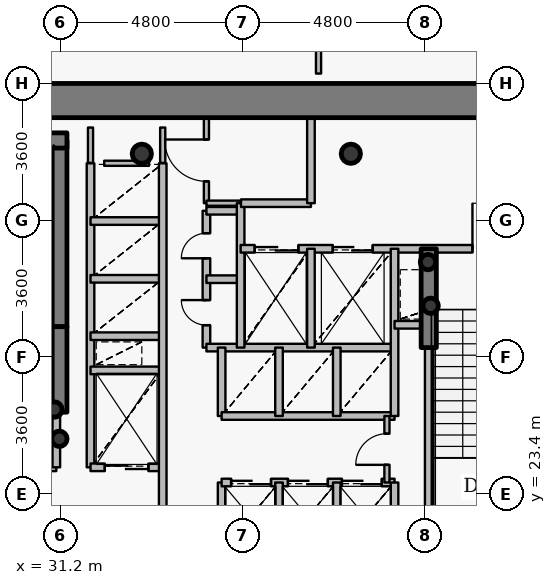
"""IFC4 building model, lengths in metres.
Left out: names, types, materials, properties, quantities, classifications, styles, units other than length and angle.
Written with IfcOpenShell. Run it as: python <this file> out.ifc"""

import sys

from ifc_helpers import new_model, si_unit, direction, frame, frame_2d, origin, origin_2d, place, context, subcontext, project, spatial, rectangle, hollow_circle, extrude, source, transform, mapped, element, fill, save


model = new_model("IFC4")
c1 = context("Model", 3, precision=1e-05, world=origin(), true_north=direction((0.0, 1.0)))
c2 = subcontext(c1, "Body", "Model", "MODEL_VIEW")
j1 = project(units=[si_unit("LENGTHUNIT", "METRE"), si_unit("PLANEANGLEUNIT", "RADIAN")], contexts=[c1])
p1 = place(None, origin())
s1 = spatial("IfcSite", under=j1, at=p1, CompositionType="ELEMENT")
p2 = place(p1, origin())
s2 = spatial("IfcBuilding", under=s1, at=p2, CompositionType="ELEMENT")
p3 = place(p2, frame((0.0, 0.0, 57.6)))
s3 = spatial("IfcBuildingStorey", under=s2, at=p3, CompositionType="ELEMENT", Elevation=57.6)
for number, where, z_axis, x_axis in (
    (1, (38.85, 32.35, 0.0), (0.0, 0.0, 1.0), (1.0, 0.0, 0.0)),
    (2, (33.35, 32.35, 0.0), (0.0, 0.0, 1.0), (1.0, 0.0, 0.0)),
):
    element("IfcColumn", number, at=place(p3, frame(where, z_axis=z_axis, x_axis=x_axis)), inside=s3, PredefinedType="COLUMN", context=c2, shape_type="SweptSolid", body=[
        extrude(hollow_circle(Radius=0.254, WallThickness=0.02, at=origin_2d()), origin(), (0.0, 0.0, 1.0), 4.2),
    ])
p4 = place(p3, frame((31.18, 27.8, 0.0), z_axis=(0.0, 0.0, 1.0), x_axis=(0.0, 1.0, 0.0)))
e3 = element("IfcWall", 3, at=p4, inside=s3, PredefinedType="SHEAR", context=c2, shape_type="SweptSolid", body=[
    extrude(rectangle(XDim=4.9, YDim=0.4, at=frame_2d((2.45, 0.0))), origin(), (0.0, 0.0, 1.0), 4.2),
])
p5 = place(p3, frame((27.28, 32.7, 0.0), z_axis=(0.0, 0.0, 1.0), x_axis=(1.0, 0.0, 0.0)))
e4 = element("IfcWall", 4, at=p5, inside=s3, PredefinedType="SHEAR", context=c2, shape_type="SweptSolid", body=[
    extrude(rectangle(XDim=4.1, YDim=0.4, at=frame_2d((2.05, 0.0))), origin(), (0.0, 0.0, 1.0), 4.2),
])
for number, where, z_axis, x_axis in (
    (5, (31.05, 25.62, 0.0), (0.0, 0.0, 1.0), (1.0, 0.0, 0.0)),
    (6, (31.18, 24.85, 0.0), (0.0, 0.0, 1.0), (1.0, 0.0, 0.0)),
    (7, (40.95, 28.35, 0.0), (0.0, 0.0, 1.0), (1.0, 0.0, 0.0)),
    (8, (40.88, 29.5, 0.0), (0.0, 0.0, 1.0), (1.0, 0.0, 0.0)),
):
    element("IfcColumn", number, at=place(p3, frame(where, z_axis=z_axis, x_axis=x_axis)), inside=s3, PredefinedType="COLUMN", context=c2, shape_type="SweptSolid", body=[
        extrude(hollow_circle(Radius=0.203, WallThickness=0.016, at=origin_2d()), origin(), (0.0, 0.0, 1.0), 4.2),
    ])
p6 = place(p3, frame((26.75, 33.75, 0.0), z_axis=(0.0, 0.0, 1.0), x_axis=(1.0, 0.0, 0.0)))
e9 = element("IfcWall", 9, at=p6, inside=s3, PredefinedType="SHEAR", context=c2, shape_type="SweptSolid", body=[
    extrude(rectangle(XDim=18.5, YDim=0.9, at=frame_2d((9.25, 0.0))), origin(), (0.0, 0.0, 1.0), 3.4),
])
p7 = place(p3, frame((31.18, 25.55, 0.0), z_axis=(0.0, 0.0, 1.0), x_axis=(0.0, 1.0, 0.0)))
e10 = element("IfcWall", 10, at=p7, inside=s3, PredefinedType="SHEAR", context=c2, shape_type="SweptSolid", body=[
    extrude(rectangle(XDim=2.25, YDim=0.4, at=frame_2d((1.125, 0.0))), origin(), (0.0, 0.0, 1.0), 3.55),
])
p8 = place(p3, frame((40.9, 27.25, 0.0), z_axis=(0.0, 0.0, 1.0), x_axis=(0.0, 1.0, 0.0)))
e11 = element("IfcWall", 11, at=p8, inside=s3, PredefinedType="SHEAR", context=c2, shape_type="SweptSolid", body=[
    extrude(rectangle(XDim=2.6, YDim=0.4, at=frame_2d((1.3, 0.0))), origin(), (0.0, 0.0, 1.0), 3.55),
])
p9 = place(p3, frame((27.56, 24.1, 0.0), z_axis=(0.0, 0.0, 1.0), x_axis=(1.0, 0.0, 0.0)))
e12 = element("IfcWall", 12, at=p9, inside=s3, PredefinedType="PARTITIONING", context=c2, shape_type="SweptSolid", body=[
    extrude(rectangle(XDim=3.54, YDim=0.2, at=frame_2d((1.77, 0.0))), origin(), (0.0, 0.0, 1.0), 3.95),
])
p10 = place(p9, frame((1.17, 0.0, 0.0)))
e13 = element("IfcOpeningElement", 13, at=p10, cuts=e12, PredefinedType="OPENING", context=c2, shape_type="SweptSolid", body=[
    extrude(rectangle(XDim=1.2, YDim=2.15, at=origin_2d()), frame((0.6, 0.11, 1.075), z_axis=(0.0, -1.0, 0.0), x_axis=(1.0, 0.0, 0.0)), (0.0, 0.0, 1.0), 0.22),
])
p11 = place(p3, frame((31.1, 24.1, 0.0), z_axis=(0.0, 0.0, 1.0), x_axis=(0.0, 1.0, 0.0)))
e14 = element("IfcWall", 14, at=p11, inside=s3, PredefinedType="PARTITIONING", context=c2, shape_type="SweptSolid", body=[
    extrude(rectangle(XDim=1.44, YDim=0.2, at=frame_2d((0.72, 0.0))), origin(), (0.0, 0.0, 1.0), 3.95),
])
p12 = place(p3, frame((32.0, 24.1, 0.0), z_axis=(0.0, 0.0, 1.0), x_axis=(0.0, 1.0, 0.0)))
e15 = element("IfcWall", 15, at=p12, inside=s3, PredefinedType="PARTITIONING", context=c2, shape_type="SweptSolid", body=[
    extrude(rectangle(XDim=8.0, YDim=0.2, at=frame_2d((4.0, 0.0))), origin(), (0.0, 0.0, 1.0), 3.95),
])
p13 = place(p3, frame((32.0, 24.1, 0.0), z_axis=(0.0, 0.0, 1.0), x_axis=(1.0, 0.0, 0.0)))
e16 = element("IfcWall", 16, at=p13, inside=s3, PredefinedType="PARTITIONING", context=c2, shape_type="SweptSolid", body=[
    extrude(rectangle(XDim=1.9, YDim=0.2, at=frame_2d((0.95, 0.0))), origin(), (0.0, 0.0, 1.0), 3.535),
])
p14 = place(p13, frame((0.375, 0.0, 0.0)))
e17 = element("IfcOpeningElement", 17, at=p14, cuts=e16, PredefinedType="OPENING", context=c2, shape_type="SweptSolid", body=[
    extrude(rectangle(XDim=1.15, YDim=2.15, at=origin_2d()), frame((0.575, 0.11, 1.075), z_axis=(0.0, -1.0, 0.0), x_axis=(1.0, 0.0, 0.0)), (0.0, 0.0, 1.0), 0.22),
])
for number, where, z_axis, x_axis in (
    (18, (32.0, 26.65, 0.0), (0.0, 0.0, 1.0), (1.0, 0.0, 0.0)),
    (19, (32.0, 27.55, 0.0), (0.0, 0.0, 1.0), (1.0, 0.0, 0.0)),
    (20, (32.0, 29.06, 0.0), (0.0, 0.0, 1.0), (1.0, 0.0, 0.0)),
    (21, (32.0, 30.58, 0.0), (0.0, 0.0, 1.0), (1.0, 0.0, 0.0)),
):
    element("IfcWall", number, at=place(p3, frame(where, z_axis=z_axis, x_axis=x_axis)), inside=s3, PredefinedType="PARTITIONING", context=c2, shape_type="SweptSolid", body=[
        extrude(rectangle(XDim=1.9, YDim=0.2, at=frame_2d((0.95, 0.0))), origin(), (0.0, 0.0, 1.0), 3.535),
    ])
p15 = place(p3, frame((33.9, 20.7, 0.0), z_axis=(0.0, 0.0, 1.0), x_axis=(0.0, 1.0, 0.0)))
e22 = element("IfcWall", 22, at=p15, inside=s3, PredefinedType="PARTITIONING", context=c2, shape_type="SweptSolid", body=[
    extrude(rectangle(XDim=11.4, YDim=0.2, at=frame_2d((5.7, 0.0))), origin(), (0.0, 0.0, 1.0), 3.535),
])
p16 = place(p3, frame((35.05, 27.25, 0.0), z_axis=(0.0, 0.0, 1.0), x_axis=(0.0, 1.0, 0.0)))
e23 = element("IfcWall", 23, at=p16, inside=s3, PredefinedType="PARTITIONING", context=c2, shape_type="SweptSolid", body=[
    extrude(rectangle(XDim=3.6, YDim=0.2, at=frame_2d((1.8, 0.0))), origin(), (0.0, 0.0, 1.0), 3.95),
])
p17 = place(p16, frame((0.59, 0.0, 0.0)))
e24 = element("IfcOpeningElement", 24, at=p17, cuts=e23, PredefinedType="OPENING", context=c2, shape_type="SweptSolid", body=[
    extrude(rectangle(XDim=0.66, YDim=2.05, at=origin_2d()), frame((0.33, 0.11, 1.025), z_axis=(0.0, -1.0, 0.0), x_axis=(1.0, 0.0, 0.0)), (0.0, 0.0, 1.0), 0.22),
])
p18 = place(p16, frame((2.35, 0.0, 0.0)))
e25 = element("IfcOpeningElement", 25, at=p18, cuts=e23, PredefinedType="OPENING", context=c2, shape_type="SweptSolid", body=[
    extrude(rectangle(XDim=0.66, YDim=2.05, at=origin_2d()), frame((0.33, 0.11, 1.025), z_axis=(0.0, -1.0, 0.0), x_axis=(1.0, 0.0, 0.0)), (0.0, 0.0, 1.0), 0.22),
])
p19 = place(p3, frame((35.05, 27.25, 0.0), z_axis=(0.0, 0.0, 1.0), x_axis=(1.0, 0.0, 0.0)))
e26 = element("IfcWall", 26, at=p19, inside=s3, PredefinedType="PARTITIONING", context=c2, shape_type="SweptSolid", body=[
    extrude(rectangle(XDim=4.95, YDim=0.2, at=frame_2d((2.475, 0.0))), origin(), (0.0, 0.0, 1.0), 3.535),
])
for number, where, z_axis, x_axis in (
    (27, (35.05, 29.05, 0.0), (0.0, 0.0, 1.0), (1.0, 0.0, 0.0)),
    (28, (35.05, 30.85, 0.0), (0.0, 0.0, 1.0), (1.0, 0.0, 0.0)),
):
    element("IfcWall", number, at=place(p3, frame(where, z_axis=z_axis, x_axis=x_axis)), inside=s3, PredefinedType="PARTITIONING", context=c2, shape_type="SweptSolid", body=[
        extrude(rectangle(XDim=0.9, YDim=0.2, at=frame_2d((0.45, 0.0))), origin(), (0.0, 0.0, 1.0), 3.95),
    ])
p20 = place(p3, frame((35.05, 31.05, 0.0), z_axis=(0.0, 0.0, 1.0), x_axis=(0.0, 1.0, 0.0)))
e29 = element("IfcWall", 29, at=p20, inside=s3, PredefinedType="PARTITIONING", context=c2, shape_type="SweptSolid", body=[
    extrude(rectangle(XDim=2.25, YDim=0.135, at=frame_2d((1.125, 0.0))), origin(), (0.0, 0.0, 1.0), 3.535),
])
p21 = place(p20, frame((0.575, 0.0, 0.0)))
e30 = element("IfcOpeningElement", 30, at=p21, cuts=e29, PredefinedType="OPENING", context=c2, shape_type="SweptSolid", body=[
    extrude(rectangle(XDim=1.1, YDim=2.15, at=origin_2d()), frame((0.55, 0.078, 1.075), z_axis=(0.0, -1.0, 0.0), x_axis=(1.0, 0.0, 0.0)), (0.0, 0.0, 1.0), 0.155),
])
p22 = place(p3, frame((35.05, 31.05, 0.0), z_axis=(0.0, 0.0, 1.0), x_axis=(1.0, 0.0, 0.0)))
e31 = element("IfcWall", 31, at=p22, inside=s3, PredefinedType="PARTITIONING", context=c2, shape_type="SweptSolid", body=[
    extrude(rectangle(XDim=0.9, YDim=0.135, at=frame_2d((0.45, 0.0))), origin(), (0.0, 0.0, 1.0), 3.95),
])
p23 = place(p3, frame((35.45, 21.9, 0.0), z_axis=(0.0, 0.0, 1.0), x_axis=(0.0, 1.0, 0.0)))
e32 = element("IfcWall", 32, at=p23, inside=s3, PredefinedType="PARTITIONING", context=c2, shape_type="SweptSolid", body=[
    extrude(rectangle(XDim=1.8, YDim=0.2, at=frame_2d((0.9, 0.0))), origin(), (0.0, 0.0, 1.0), 3.95),
])
p24 = place(p3, frame((35.45, 23.7, 0.0), z_axis=(0.0, 0.0, 1.0), x_axis=(1.0, 0.0, 0.0)))
e33 = element("IfcWall", 33, at=p24, inside=s3, PredefinedType="PARTITIONING", context=c2, shape_type="SweptSolid", body=[
    extrude(rectangle(XDim=4.55, YDim=0.2, at=frame_2d((2.275, 0.0))), origin(), (0.0, 0.0, 1.0), 3.535),
])
p25 = place(p24, frame((0.25, 0.0, 0.0)))
e34 = element("IfcOpeningElement", 34, at=p25, cuts=e33, PredefinedType="OPENING", context=c2, shape_type="SweptSolid", body=[
    extrude(rectangle(XDim=1.05, YDim=2.15, at=origin_2d()), frame((0.525, 0.11, 1.075), z_axis=(0.0, -1.0, 0.0), x_axis=(1.0, 0.0, 0.0)), (0.0, 0.0, 1.0), 0.22),
])
p26 = place(p24, frame((1.745, 0.0, 0.0)))
e35 = element("IfcOpeningElement", 35, at=p26, cuts=e33, PredefinedType="OPENING", context=c2, shape_type="SweptSolid", body=[
    extrude(rectangle(XDim=1.05, YDim=2.15, at=origin_2d()), frame((0.525, 0.11, 1.075), z_axis=(0.0, -1.0, 0.0), x_axis=(1.0, 0.0, 0.0)), (0.0, 0.0, 1.0), 0.22),
])
p27 = place(p24, frame((3.165, 0.0, 0.0)))
e36 = element("IfcOpeningElement", 36, at=p27, cuts=e33, PredefinedType="OPENING", context=c2, shape_type="SweptSolid", body=[
    extrude(rectangle(XDim=1.05, YDim=2.15, at=origin_2d()), frame((0.525, 0.11, 1.075), z_axis=(0.0, -1.0, 0.0), x_axis=(1.0, 0.0, 0.0)), (0.0, 0.0, 1.0), 0.22),
])
p28 = place(p3, frame((35.45, 25.45, 0.0), z_axis=(0.0, 0.0, 1.0), x_axis=(0.0, 1.0, 0.0)))
e37 = element("IfcWall", 37, at=p28, inside=s3, PredefinedType="PARTITIONING", context=c2, shape_type="SweptSolid", body=[
    extrude(rectangle(XDim=1.8, YDim=0.2, at=frame_2d((0.9, 0.0))), origin(), (0.0, 0.0, 1.0), 3.95),
])
p29 = place(p3, frame((35.45, 25.45, 0.0), z_axis=(0.0, 0.0, 1.0), x_axis=(1.0, 0.0, 0.0)))
e38 = element("IfcWall", 38, at=p29, inside=s3, PredefinedType="PARTITIONING", context=c2, shape_type="SweptSolid", body=[
    extrude(rectangle(XDim=4.55, YDim=0.2, at=frame_2d((2.275, 0.0))), origin(), (0.0, 0.0, 1.0), 3.535),
])
p30 = place(p3, frame((35.95, 27.25, 0.0), z_axis=(0.0, 0.0, 1.0), x_axis=(0.0, 1.0, 0.0)))
e39 = element("IfcWall", 39, at=p30, inside=s3, PredefinedType="PARTITIONING", context=c2, shape_type="SweptSolid", body=[
    extrude(rectangle(XDim=3.8, YDim=0.2, at=frame_2d((1.9, 0.0))), origin(), (0.0, 0.0, 1.0), 3.95),
])
p31 = place(p3, frame((35.95, 29.85, 0.0), z_axis=(0.0, 0.0, 1.0), x_axis=(1.0, 0.0, 0.0)))
e40 = element("IfcWall", 40, at=p31, inside=s3, PredefinedType="PARTITIONING", context=c2, shape_type="SweptSolid", body=[
    extrude(rectangle(XDim=8.49, YDim=0.2, at=frame_2d((4.245, 0.0))), origin(), (0.0, 0.0, 1.0), 3.535),
])
p32 = place(p31, frame((6.1, 0.0, 0.0)))
e41 = element("IfcOpeningElement", 41, at=p32, cuts=e40, PredefinedType="OPENING", context=c2, shape_type="SweptSolid", body=[
    extrude(rectangle(XDim=1.2, YDim=2.15, at=origin_2d()), frame((0.6, 0.11, 1.075), z_axis=(0.0, -1.0, 0.0), x_axis=(1.0, 0.0, 0.0)), (0.0, 0.0, 1.0), 0.22),
])
p33 = place(p31, frame((0.37, 0.0, 0.0)))
e42 = element("IfcOpeningElement", 42, at=p33, cuts=e40, PredefinedType="OPENING", context=c2, shape_type="SweptSolid", body=[
    extrude(rectangle(XDim=1.15, YDim=2.15, at=origin_2d()), frame((0.575, 0.11, 1.075), z_axis=(0.0, -1.0, 0.0), x_axis=(1.0, 0.0, 0.0)), (0.0, 0.0, 1.0), 0.22),
])
p34 = place(p31, frame((2.425, 0.0, 0.0)))
e43 = element("IfcOpeningElement", 43, at=p34, cuts=e40, PredefinedType="OPENING", context=c2, shape_type="SweptSolid", body=[
    extrude(rectangle(XDim=1.05, YDim=2.15, at=origin_2d()), frame((0.525, 0.11, 1.075), z_axis=(0.0, -1.0, 0.0), x_axis=(1.0, 0.0, 0.0)), (0.0, 0.0, 1.0), 0.22),
])
p35 = place(p3, frame((35.96, 31.05, 0.0), z_axis=(0.0, 0.0, 1.0), x_axis=(1.0, 0.0, 0.0)))
e44 = element("IfcWall", 44, at=p35, inside=s3, PredefinedType="PARTITIONING", context=c2, shape_type="SweptSolid", body=[
    extrude(rectangle(XDim=1.84, YDim=0.2, at=frame_2d((0.92, 0.0))), origin(), (0.0, 0.0, 1.0), 3.95),
])
for number, where, z_axis, x_axis in (
    (45, (36.96, 21.9, 0.0), (0.0, 0.0, 1.0), (0.0, 1.0, 0.0)),
    (46, (36.96, 25.45, 0.0), (0.0, 0.0, 1.0), (0.0, 1.0, 0.0)),
):
    element("IfcWall", number, at=place(p3, frame(where, z_axis=z_axis, x_axis=x_axis)), inside=s3, PredefinedType="PARTITIONING", context=c2, shape_type="SweptSolid", body=[
        extrude(rectangle(XDim=1.8, YDim=0.2, at=frame_2d((0.9, 0.0))), origin(), (0.0, 0.0, 1.0), 3.95),
    ])
p36 = place(p3, frame((37.8, 27.25, 0.0), z_axis=(0.0, 0.0, 1.0), x_axis=(0.0, 1.0, 0.0)))
e47 = element("IfcWall", 47, at=p36, inside=s3, PredefinedType="PARTITIONING", context=c2, shape_type="SweptSolid", body=[
    extrude(rectangle(XDim=2.6, YDim=0.2, at=frame_2d((1.3, 0.0))), origin(), (0.0, 0.0, 1.0), 3.95),
])
p37 = place(p3, frame((37.8, 31.05, 0.0), z_axis=(0.0, 0.0, 1.0), x_axis=(0.0, 1.0, 0.0)))
e48 = element("IfcWall", 48, at=p37, inside=s3, PredefinedType="PARTITIONING", context=c2, shape_type="SweptSolid", body=[
    extrude(rectangle(XDim=2.25, YDim=0.2, at=frame_2d((1.125, 0.0))), origin(), (0.0, 0.0, 1.0), 3.535),
])
for number, where, z_axis, x_axis in (
    (49, (38.48, 21.9, 0.0), (0.0, 0.0, 1.0), (0.0, 1.0, 0.0)),
    (50, (38.48, 25.45, 0.0), (0.0, 0.0, 1.0), (0.0, 1.0, 0.0)),
):
    element("IfcWall", number, at=place(p3, frame(where, z_axis=z_axis, x_axis=x_axis)), inside=s3, PredefinedType="PARTITIONING", context=c2, shape_type="SweptSolid", body=[
        extrude(rectangle(XDim=1.8, YDim=0.2, at=frame_2d((0.9, 0.0))), origin(), (0.0, 0.0, 1.0), 3.95),
    ])
p38 = place(p3, frame((39.8, 23.7, 0.0), z_axis=(0.0, 0.0, 1.0), x_axis=(0.0, 1.0, 0.0)))
e51 = element("IfcWall", 51, at=p38, inside=s3, PredefinedType="PARTITIONING", context=c2, shape_type="SweptSolid", body=[
    extrude(rectangle(XDim=1.75, YDim=0.135, at=frame_2d((0.875, 0.0))), origin(), (0.0, 0.0, 1.0), 3.95),
])
p39 = place(p38, frame((0.465, 0.0, 0.0)))
e52 = element("IfcOpeningElement", 52, at=p39, cuts=e51, PredefinedType="OPENING", context=c2, shape_type="SweptSolid", body=[
    extrude(rectangle(XDim=0.82, YDim=2.1, at=origin_2d()), frame((0.41, 0.078, 1.05), z_axis=(0.0, -1.0, 0.0), x_axis=(1.0, 0.0, 0.0)), (0.0, 0.0, 1.0), 0.155),
])
p40 = place(p3, frame((40.0, 21.9, 0.0), z_axis=(0.0, 0.0, 1.0), x_axis=(0.0, 1.0, 0.0)))
e53 = element("IfcWall", 53, at=p40, inside=s3, PredefinedType="PARTITIONING", context=c2, shape_type="SweptSolid", body=[
    extrude(rectangle(XDim=1.8, YDim=0.2, at=frame_2d((0.9, 0.0))), origin(), (0.0, 0.0, 1.0), 3.95),
])
p41 = place(p3, frame((40.0, 25.45, 0.0), z_axis=(0.0, 0.0, 1.0), x_axis=(0.0, 1.0, 0.0)))
e54 = element("IfcWall", 54, at=p41, inside=s3, PredefinedType="PARTITIONING", context=c2, shape_type="SweptSolid", body=[
    extrude(rectangle(XDim=4.4, YDim=0.2, at=frame_2d((2.2, 0.0))), origin(), (0.0, 0.0, 1.0), 3.95),
])
p42 = place(p3, frame((40.0, 27.85, 0.0), z_axis=(0.0, 0.0, 1.0), x_axis=(1.0, 0.0, 0.0)))
e55 = element("IfcWall", 55, at=p42, inside=s3, PredefinedType="PARTITIONING", context=c2, shape_type="SweptSolid", body=[
    extrude(rectangle(XDim=0.9, YDim=0.2, at=frame_2d((0.45, 0.0))), origin(), (0.0, 0.0, 1.0), 3.95),
])
p43 = place(p3, frame((40.9, 21.33, 0.0), z_axis=(0.0, 0.0, 1.0), x_axis=(0.0, 1.0, 0.0)))
e56 = element("IfcWall", 56, at=p43, inside=s3, PredefinedType="PARTITIONING", context=c2, shape_type="SweptSolid", body=[
    extrude(rectangle(XDim=5.91, YDim=0.2, at=frame_2d((2.955, 0.0))), origin(), (0.0, 0.0, 1.0), 3.485),
])
p44 = place(p3, frame((32.36, 32.1, 0.0), z_axis=(0.0, 0.0, 1.0), x_axis=(1.0, 0.0, 0.0)))
e57 = element("IfcWall", 57, at=p44, inside=s3, PredefinedType="PARTITIONING", context=c2, shape_type="SweptSolid", body=[
    extrude(rectangle(XDim=1.18, YDim=0.135, at=frame_2d((0.59, 0.0))), origin(), (0.0, 0.0, 1.0), 3.535),
])
p45 = place(p3, frame((32.0, 33.04, 0.0), z_axis=(0.0, 0.0, 1.0), x_axis=(0.0, -1.0, 0.0)))
e58 = element("IfcWall", 58, at=p45, inside=s3, PredefinedType="PARTITIONING", context=c2, shape_type="SweptSolid", body=[
    extrude(rectangle(XDim=0.93, YDim=0.135, at=frame_2d((0.465, 0.0))), origin(), (0.0, 0.0, 1.0), 3.485),
])
p46 = place(p3, frame((33.9, 32.11, 0.0), z_axis=(0.0, 0.0, 1.0), x_axis=(0.0, 1.0, 0.0)))
e59 = element("IfcWall", 59, at=p46, inside=s3, PredefinedType="PARTITIONING", context=c2, shape_type="SweptSolid", body=[
    extrude(rectangle(XDim=0.93, YDim=0.135, at=frame_2d((0.465, 0.0))), origin(), (0.0, 0.0, 1.0), 3.535),
])
p47 = place(p3, frame((38.0, 34.46, 0.0), z_axis=(0.0, 0.0, 1.0), x_axis=(0.0, 1.0, 0.0)))
e60 = element("IfcWall", 60, at=p47, inside=s3, PredefinedType="PARTITIONING", context=c2, shape_type="SweptSolid", body=[
    extrude(rectangle(XDim=1.64, YDim=0.135, at=frame_2d((0.82, 0.0))), origin(), (0.0, 0.0, 1.0), 3.95),
])
m1 = source(origin(), c2, "Body", "SweptSolid", [
    extrude(rectangle(XDim=1.2, YDim=2.15, at=origin_2d()), frame((0.6, 0.025, 1.075), z_axis=(0.0, -1.0, 0.0), x_axis=(1.0, 0.0, 0.0)), (0.0, 0.0, 1.0), 0.05),
])
p48 = place(p32, origin())
e61 = element("IfcDoor", 61, at=p48, inside=s3, OperationType="SINGLE_SWING_LEFT", PredefinedType="DOOR", context=c2, shape_type="MappedRepresentation", body=[
    mapped(m1, transform((0.0, 0.0, 0.0), x_axis=(1.0, 0.0, 0.0), y_axis=(0.0, 1.0, 0.0), z_axis=(0.0, 0.0, 1.0), scale=1.0)),
])
fill(e41, e61)
m2 = source(origin(), c2, "Body", "SweptSolid", [
    extrude(rectangle(XDim=1.15, YDim=2.15, at=origin_2d()), frame((0.575, 0.025, 1.075), z_axis=(0.0, -1.0, 0.0), x_axis=(1.0, 0.0, 0.0)), (0.0, 0.0, 1.0), 0.05),
])
p49 = place(p33, origin())
e62 = element("IfcDoor", 62, at=p49, inside=s3, OperationType="DOUBLE_DOOR_SLIDING", PredefinedType="USERDEFINED", context=c2, shape_type="MappedRepresentation", body=[
    mapped(m2, transform((0.0, 0.0, 0.0), x_axis=(1.0, 0.0, 0.0), y_axis=(0.0, 1.0, 0.0), z_axis=(0.0, 0.0, 1.0), scale=1.0)),
])
fill(e42, e62)
p50 = place(p14, origin())
e63 = element("IfcDoor", 63, at=p50, inside=s3, OperationType="DOUBLE_DOOR_SLIDING", PredefinedType="USERDEFINED", context=c2, shape_type="MappedRepresentation", body=[
    mapped(m2, transform((0.0, 0.0, 0.0), x_axis=(1.0, 0.0, 0.0), y_axis=(0.0, 1.0, 0.0), z_axis=(0.0, 0.0, 1.0), scale=1.0)),
])
fill(e17, e63)
m3 = source(origin(), c2, "Body", "SweptSolid", [
    extrude(rectangle(XDim=1.05, YDim=2.15, at=origin_2d()), frame((0.525, 0.025, 1.075), z_axis=(0.0, -1.0, 0.0), x_axis=(1.0, 0.0, 0.0)), (0.0, 0.0, 1.0), 0.05),
])
p51 = place(p34, origin())
e64 = element("IfcDoor", 64, at=p51, inside=s3, OperationType="DOUBLE_DOOR_SLIDING", PredefinedType="USERDEFINED", context=c2, shape_type="MappedRepresentation", body=[
    mapped(m3, transform((0.0, 0.0, 0.0), x_axis=(1.0, 0.0, 0.0), y_axis=(0.0, 1.0, 0.0), z_axis=(0.0, 0.0, 1.0), scale=1.0)),
])
fill(e43, e64)
p52 = place(p25, origin())
e65 = element("IfcDoor", 65, at=p52, inside=s3, OperationType="DOUBLE_DOOR_SLIDING", PredefinedType="USERDEFINED", context=c2, shape_type="MappedRepresentation", body=[
    mapped(m3, transform((0.0, 0.0, 0.0), x_axis=(1.0, 0.0, 0.0), y_axis=(0.0, 1.0, 0.0), z_axis=(0.0, 0.0, 1.0), scale=1.0)),
])
fill(e34, e65)
p53 = place(p26, origin())
e66 = element("IfcDoor", 66, at=p53, inside=s3, OperationType="DOUBLE_DOOR_SLIDING", PredefinedType="USERDEFINED", context=c2, shape_type="MappedRepresentation", body=[
    mapped(m3, transform((0.0, 0.0, 0.0), x_axis=(1.0, 0.0, 0.0), y_axis=(0.0, 1.0, 0.0), z_axis=(0.0, 0.0, 1.0), scale=1.0)),
])
fill(e35, e66)
p54 = place(p27, origin())
e67 = element("IfcDoor", 67, at=p54, inside=s3, OperationType="DOUBLE_DOOR_SLIDING", PredefinedType="USERDEFINED", context=c2, shape_type="MappedRepresentation", body=[
    mapped(m3, transform((0.0, 0.0, 0.0), x_axis=(1.0, 0.0, 0.0), y_axis=(0.0, 1.0, 0.0), z_axis=(0.0, 0.0, 1.0), scale=1.0)),
])
fill(e36, e67)
m4 = source(origin(), c2, "Body", "SweptSolid", [
    extrude(rectangle(XDim=0.66, YDim=2.05, at=origin_2d()), frame((0.33, 0.025, 1.025), z_axis=(0.0, -1.0, 0.0), x_axis=(1.0, 0.0, 0.0)), (0.0, 0.0, 1.0), 0.05),
])
p55 = place(p17, origin())
e68 = element("IfcDoor", 68, at=p55, inside=s3, OperationType="SINGLE_SWING_RIGHT", PredefinedType="USERDEFINED", context=c2, shape_type="MappedRepresentation", body=[
    mapped(m4, transform((0.0, 0.0, 0.0), x_axis=(1.0, 0.0, 0.0), y_axis=(0.0, 1.0, 0.0), z_axis=(0.0, 0.0, 1.0), scale=1.0)),
])
fill(e24, e68)
p56 = place(p18, origin())
e69 = element("IfcDoor", 69, at=p56, inside=s3, OperationType="SINGLE_SWING_LEFT", PredefinedType="USERDEFINED", context=c2, shape_type="MappedRepresentation", body=[
    mapped(m4, transform((0.0, 0.0, 0.0), x_axis=(1.0, 0.0, 0.0), y_axis=(0.0, 1.0, 0.0), z_axis=(0.0, 0.0, 1.0), scale=1.0)),
])
fill(e25, e69)
m5 = source(origin(), c2, "Body", "SweptSolid", [
    extrude(rectangle(XDim=1.1, YDim=2.15, at=origin_2d()), frame((0.55, 0.025, 1.075), z_axis=(0.0, -1.0, 0.0), x_axis=(1.0, 0.0, 0.0)), (0.0, 0.0, 1.0), 0.05),
])
p57 = place(p21, origin())
e70 = element("IfcDoor", 70, at=p57, inside=s3, OperationType="SINGLE_SWING_RIGHT", PredefinedType="DOOR", context=c2, shape_type="MappedRepresentation", body=[
    mapped(m5, transform((0.0, 0.0, 0.0), x_axis=(1.0, 0.0, 0.0), y_axis=(0.0, 1.0, 0.0), z_axis=(0.0, 0.0, 1.0), scale=1.0)),
])
fill(e30, e70)
m6 = source(origin(), c2, "Body", "SweptSolid", [
    extrude(rectangle(XDim=0.82, YDim=2.1, at=origin_2d()), frame((0.41, 0.025, 1.05), z_axis=(0.0, -1.0, 0.0), x_axis=(1.0, 0.0, 0.0)), (0.0, 0.0, 1.0), 0.05),
])
p58 = place(p39, origin())
e71 = element("IfcDoor", 71, at=p58, inside=s3, OperationType="SINGLE_SWING_LEFT", PredefinedType="DOOR", context=c2, shape_type="MappedRepresentation", body=[
    mapped(m6, transform((0.0, 0.0, 0.0), x_axis=(1.0, 0.0, 0.0), y_axis=(0.0, 1.0, 0.0), z_axis=(0.0, 0.0, 1.0), scale=1.0)),
])
fill(e52, e71)
save(model, sys.argv[1])
